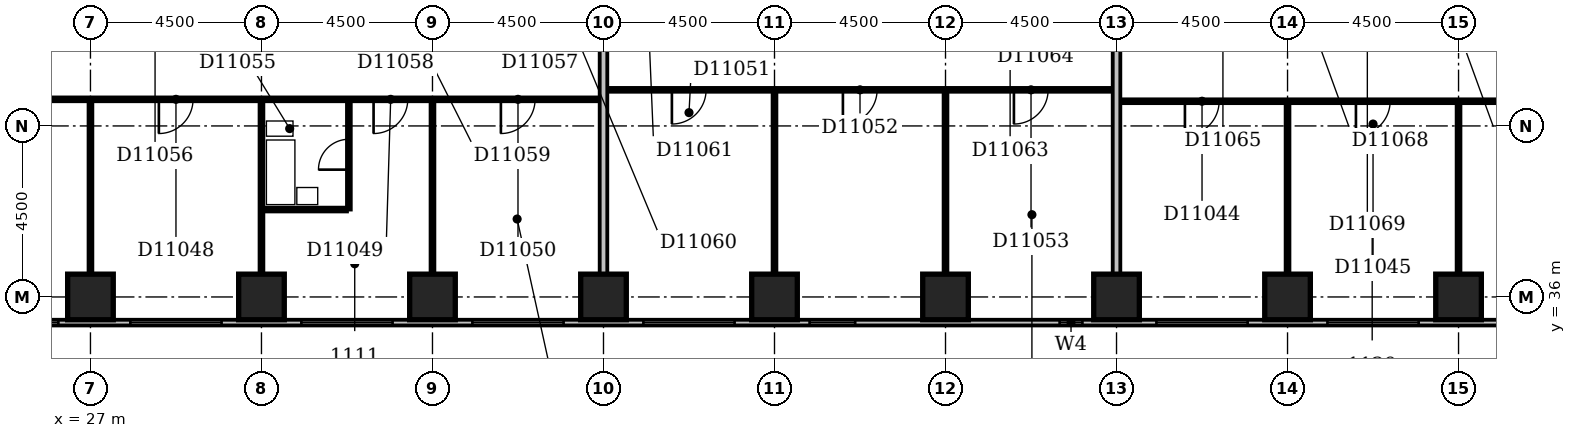
"""IFC4 building model, lengths in metres.
Left out: names, types, materials, properties, quantities, classifications, styles, units other than length and angle.
Written with IfcOpenShell. Run it as: python <this file> out.ifc"""

import sys

from ifc_helpers import new_model, si_unit, direction, frame, frame_2d, origin, origin_2d, place, context, subcontext, project, spatial, rectangle, extrude, element, fill, save


model = new_model("IFC4")
c1 = context("Model", 3, precision=1e-05, world=origin(), true_north=direction((0.0, 1.0)))
c2 = subcontext(c1, "Body", "Model", "MODEL_VIEW")
j1 = project(units=[si_unit("LENGTHUNIT", "METRE"), si_unit("PLANEANGLEUNIT", "RADIAN")], contexts=[c1])
p1 = place(None, origin())
s1 = spatial("IfcSite", under=j1, at=p1, CompositionType="ELEMENT")
p2 = place(p1, origin())
s2 = spatial("IfcBuilding", under=s1, at=p2, CompositionType="ELEMENT")
p3 = place(p2, frame((0.0, 0.0, 50.6)))
s3 = spatial("IfcBuildingStorey", under=s2, at=p3, CompositionType="ELEMENT", Elevation=50.6)
for number, where, z_axis, x_axis in (
    (1, (27.0, 36.0, -0.3), (0.0, 0.0, 1.0), (1.0, 0.0, 0.0)),
    (2, (31.5, 36.0, -0.3), (0.0, 0.0, 1.0), (1.0, 0.0, 0.0)),
    (3, (36.0, 36.0, -0.3), (0.0, 0.0, 1.0), (1.0, 0.0, 0.0)),
    (4, (40.5, 36.0, -0.3), (0.0, 0.0, 1.0), (1.0, 0.0, 0.0)),
    (5, (45.0, 36.0, -0.3), (0.0, 0.0, 1.0), (1.0, 0.0, 0.0)),
    (6, (49.5, 36.0, -0.3), (0.0, 0.0, 1.0), (1.0, 0.0, 0.0)),
    (7, (54.0, 36.0, -0.3), (0.0, 0.0, 1.0), (1.0, 0.0, 0.0)),
    (8, (58.5, 36.0, -0.3), (0.0, 0.0, 1.0), (1.0, 0.0, 0.0)),
    (9, (63.0, 36.0, -0.3), (0.0, 0.0, 1.0), (1.0, 0.0, 0.0)),
):
    element("IfcColumn", number, at=place(p3, frame(where, z_axis=z_axis, x_axis=x_axis)), inside=s3, PredefinedType="COLUMN", context=c2, shape_type="SweptSolid", body=[
        extrude(rectangle(XDim=1.2, YDim=1.2, at=origin_2d()), origin(), (0.0, 0.0, 1.0), 3.6),
    ])
p4 = place(p3, frame((23.1, 35.325, 0.0), z_axis=(0.0, 0.0, 1.0), x_axis=(1.0, 0.0, 0.0)))
e10 = element("IfcWall", 10, at=p4, inside=s3, PredefinedType="STANDARD", context=c2, shape_type="SweptSolid", body=[
    extrude(rectangle(XDim=45.15, YDim=0.15, at=frame_2d((22.575, 0.0))), origin(), (0.0, 0.0, 1.0), 2.7),
])
p5 = place(p4, frame((0.235, 0.0, 0.6)))
e11 = element("IfcOpeningElement", 11, at=p5, cuts=e10, PredefinedType="OPENING", context=c2, shape_type="SweptSolid", body=[
    extrude(rectangle(XDim=0.45, YDim=1.8, at=frame_2d((0.225, 0.9))), frame((0.0, 0.087, 0.0), z_axis=(0.0, -1.0, 0.0), x_axis=(1.0, 0.0, 0.0)), (0.0, 0.0, 1.0), 0.174),
])
p6 = place(p4, frame((2.605, 0.0, 0.6)))
e12 = element("IfcOpeningElement", 12, at=p6, cuts=e10, PredefinedType="OPENING", context=c2, shape_type="SweptSolid", body=[
    extrude(rectangle(XDim=0.45, YDim=1.8, at=frame_2d((0.225, 0.9))), frame((0.0, 0.087, 0.0), z_axis=(0.0, -1.0, 0.0), x_axis=(1.0, 0.0, 0.0)), (0.0, 0.0, 1.0), 0.174),
])
p7 = place(p4, frame((4.95, 0.0, 0.6)))
e13 = element("IfcOpeningElement", 13, at=p7, cuts=e10, PredefinedType="OPENING", context=c2, shape_type="SweptSolid", body=[
    extrude(rectangle(XDim=2.4, YDim=1.8, at=frame_2d((1.2, 0.9))), frame((0.0, 0.087, 0.0), z_axis=(0.0, -1.0, 0.0), x_axis=(1.0, 0.0, 0.0)), (0.0, 0.0, 1.0), 0.174),
])
p8 = place(p4, frame((9.45, 0.0, 0.6)))
e14 = element("IfcOpeningElement", 14, at=p8, cuts=e10, PredefinedType="OPENING", context=c2, shape_type="SweptSolid", body=[
    extrude(rectangle(XDim=2.4, YDim=1.8, at=frame_2d((1.2, 0.9))), frame((0.0, 0.087, 0.0), z_axis=(0.0, -1.0, 0.0), x_axis=(1.0, 0.0, 0.0)), (0.0, 0.0, 1.0), 0.174),
])
p9 = place(p4, frame((13.95, 0.0, 0.6)))
e15 = element("IfcOpeningElement", 15, at=p9, cuts=e10, PredefinedType="OPENING", context=c2, shape_type="SweptSolid", body=[
    extrude(rectangle(XDim=2.4, YDim=1.8, at=frame_2d((1.2, 0.9))), frame((0.0, 0.087, 0.0), z_axis=(0.0, -1.0, 0.0), x_axis=(1.0, 0.0, 0.0)), (0.0, 0.0, 1.0), 0.174),
])
p10 = place(p4, frame((18.45, 0.0, 0.6)))
e16 = element("IfcOpeningElement", 16, at=p10, cuts=e10, PredefinedType="OPENING", context=c2, shape_type="SweptSolid", body=[
    extrude(rectangle(XDim=2.4, YDim=1.8, at=frame_2d((1.2, 0.9))), frame((0.0, 0.087, 0.0), z_axis=(0.0, -1.0, 0.0), x_axis=(1.0, 0.0, 0.0)), (0.0, 0.0, 1.0), 0.174),
])
p11 = place(p4, frame((22.823, 0.0, 0.6)))
e17 = element("IfcOpeningElement", 17, at=p11, cuts=e10, PredefinedType="OPENING", context=c2, shape_type="SweptSolid", body=[
    extrude(rectangle(XDim=1.2, YDim=1.8, at=frame_2d((0.6, 0.9))), frame((0.0, 0.087, 0.0), z_axis=(0.0, -1.0, 0.0), x_axis=(1.0, 0.0, 0.0)), (0.0, 0.0, 1.0), 0.174),
])
p12 = place(p4, frame((29.403, 0.0, 0.6)))
e18 = element("IfcOpeningElement", 18, at=p12, cuts=e10, PredefinedType="OPENING", context=c2, shape_type="SweptSolid", body=[
    extrude(rectangle(XDim=0.6, YDim=1.8, at=frame_2d((0.3, 0.9))), frame((0.0, 0.087, 0.0), z_axis=(0.0, -1.0, 0.0), x_axis=(1.0, 0.0, 0.0)), (0.0, 0.0, 1.0), 0.174),
])
p13 = place(p4, frame((31.95, 0.0, 0.6)))
e19 = element("IfcOpeningElement", 19, at=p13, cuts=e10, PredefinedType="OPENING", context=c2, shape_type="SweptSolid", body=[
    extrude(rectangle(XDim=2.4, YDim=1.8, at=frame_2d((1.2, 0.9))), frame((0.0, 0.087, 0.0), z_axis=(0.0, -1.0, 0.0), x_axis=(1.0, 0.0, 0.0)), (0.0, 0.0, 1.0), 0.174),
])
p14 = place(p4, frame((36.45, 0.0, 0.6)))
e20 = element("IfcOpeningElement", 20, at=p14, cuts=e10, PredefinedType="OPENING", context=c2, shape_type="SweptSolid", body=[
    extrude(rectangle(XDim=2.4, YDim=1.8, at=frame_2d((1.2, 0.9))), frame((0.0, 0.087, 0.0), z_axis=(0.0, -1.0, 0.0), x_axis=(1.0, 0.0, 0.0)), (0.0, 0.0, 1.0), 0.174),
])
p15 = place(p4, frame((40.95, 0.0, 0.6)))
e21 = element("IfcOpeningElement", 21, at=p15, cuts=e10, PredefinedType="OPENING", context=c2, shape_type="SweptSolid", body=[
    extrude(rectangle(XDim=2.4, YDim=1.8, at=frame_2d((1.2, 0.9))), frame((0.0, 0.087, 0.0), z_axis=(0.0, -1.0, 0.0), x_axis=(1.0, 0.0, 0.0)), (0.0, 0.0, 1.0), 0.174),
])
p16 = place(p3, frame((27.0, 36.6, 0.0), z_axis=(0.0, 0.0, 1.0), x_axis=(0.0, 1.0, 0.0)))
e22 = element("IfcWall", 22, at=p16, inside=s3, PredefinedType="PARTITIONING", context=c2, shape_type="SweptSolid", body=[
    extrude(rectangle(XDim=4.55, YDim=0.1, at=frame_2d((2.275, 0.0))), origin(), (0.0, 0.0, 1.0), 2.6),
])
p17 = place(p3, frame((31.5, 36.6, 0.0), z_axis=(0.0, 0.0, 1.0), x_axis=(0.0, 1.0, 0.0)))
e23 = element("IfcWall", 23, at=p17, inside=s3, PredefinedType="PARTITIONING", context=c2, shape_type="SweptSolid", body=[
    extrude(rectangle(XDim=4.55, YDim=0.1, at=frame_2d((2.275, 0.0))), origin(), (0.0, 0.0, 1.0), 3.3),
])
p18 = place(p3, frame((36.0, 36.6, 0.0), z_axis=(0.0, 0.0, 1.0), x_axis=(0.0, 1.0, 0.0)))
e24 = element("IfcWall", 24, at=p18, inside=s3, PredefinedType="PARTITIONING", context=c2, shape_type="SweptSolid", body=[
    extrude(rectangle(XDim=4.55, YDim=0.1, at=frame_2d((2.275, 0.0))), origin(), (0.0, 0.0, 1.0), 2.4),
])
p19 = place(p3, frame((40.5, 36.6, 0.0), z_axis=(0.0, 0.0, 1.0), x_axis=(0.0, 1.0, 0.0)))
e25 = element("IfcWall", 25, at=p19, inside=s3, PredefinedType="PARTITIONING", context=c2, shape_type="SweptSolid", body=[
    extrude(rectangle(XDim=12.8, YDim=0.2, at=frame_2d((6.4, 0.0))), origin(), (0.0, 0.0, 1.0), 3.3),
])
p20 = place(p3, frame((45.0, 36.6, 0.0), z_axis=(0.0, 0.0, 1.0), x_axis=(0.0, 1.0, 0.0)))
e26 = element("IfcWall", 26, at=p20, inside=s3, PredefinedType="PARTITIONING", context=c2, shape_type="SweptSolid", body=[
    extrude(rectangle(XDim=4.8, YDim=0.1, at=frame_2d((2.4, 0.0))), origin(), (0.0, 0.0, 1.0), 2.6),
])
p21 = place(p3, frame((49.5, 36.6, 0.0), z_axis=(0.0, 0.0, 1.0), x_axis=(0.0, 1.0, 0.0)))
e27 = element("IfcWall", 27, at=p21, inside=s3, PredefinedType="PARTITIONING", context=c2, shape_type="SweptSolid", body=[
    extrude(rectangle(XDim=4.8, YDim=0.1, at=frame_2d((2.4, 0.0))), origin(), (0.0, 0.0, 1.0), 3.3),
])
p22 = place(p3, frame((54.0, 36.6, 0.0), z_axis=(0.0, 0.0, 1.0), x_axis=(0.0, 1.0, 0.0)))
e28 = element("IfcWall", 28, at=p22, inside=s3, PredefinedType="PARTITIONING", context=c2, shape_type="SweptSolid", body=[
    extrude(rectangle(XDim=12.8, YDim=0.2, at=frame_2d((6.4, 0.0))), origin(), (0.0, 0.0, 1.0), 2.6),
])
p23 = place(p3, frame((58.5, 36.6, 0.0), z_axis=(0.0, 0.0, 1.0), x_axis=(0.0, 1.0, 0.0)))
e29 = element("IfcWall", 29, at=p23, inside=s3, PredefinedType="PARTITIONING", context=c2, shape_type="SweptSolid", body=[
    extrude(rectangle(XDim=4.5, YDim=0.1, at=frame_2d((2.25, 0.0))), origin(), (0.0, 0.0, 1.0), 3.3),
])
p24 = place(p3, frame((63.0, 36.6, 0.0), z_axis=(0.0, 0.0, 1.0), x_axis=(0.0, 1.0, 0.0)))
e30 = element("IfcWall", 30, at=p24, inside=s3, PredefinedType="PARTITIONING", context=c2, shape_type="SweptSolid", body=[
    extrude(rectangle(XDim=4.5, YDim=0.1, at=frame_2d((2.25, 0.0))), origin(), (0.0, 0.0, 1.0), 2.4),
])
p25 = place(p3, frame((31.55, 38.3, 0.0), z_axis=(0.0, 0.0, 1.0), x_axis=(1.0, 0.0, 0.0)))
e31 = element("IfcWall", 31, at=p25, inside=s3, PredefinedType="PLUMBINGWALL", context=c2, shape_type="SweptSolid", body=[
    extrude(rectangle(XDim=2.2, YDim=0.1, at=frame_2d((1.1, 0.0))), origin(), (0.0, 0.0, 1.0), 3.3),
])
p26 = place(p3, frame((33.8, 38.3, 0.0), z_axis=(0.0, 0.0, 1.0), x_axis=(0.0, 1.0, 0.0)))
e32 = element("IfcWall", 32, at=p26, inside=s3, PredefinedType="PLUMBINGWALL", context=c2, shape_type="SweptSolid", body=[
    extrude(rectangle(XDim=2.85, YDim=0.1, at=frame_2d((1.425, 0.0))), origin(), (0.0, 0.0, 1.0), 3.3),
])
p27 = place(p26, frame((1.05, 0.0, 0.0)))
e33 = element("IfcOpeningElement", 33, at=p27, cuts=e32, PredefinedType="OPENING", context=c2, shape_type="SweptSolid", body=[
    extrude(rectangle(XDim=0.8, YDim=2.1, at=frame_2d((0.4, 1.05))), frame((0.0, 0.062, 0.0), z_axis=(0.0, -1.0, 0.0), x_axis=(1.0, 0.0, 0.0)), (0.0, 0.0, 1.0), 0.124),
])
p28 = place(p3, frame((54.1, 41.15, 0.0), z_axis=(0.0, 0.0, 1.0), x_axis=(1.0, 0.0, 0.0)))
e34 = element("IfcWall", 34, at=p28, inside=s3, PredefinedType="PARTITIONING", context=c2, shape_type="SweptSolid", body=[
    extrude(rectangle(XDim=14.0, YDim=0.1, at=frame_2d((7.0, 0.0))), origin(), (0.0, 0.0, 1.0), 3.3),
])
p29 = place(p28, frame((1.7, 0.0, 0.0)))
e35 = element("IfcOpeningElement", 35, at=p29, cuts=e34, PredefinedType="OPENING", context=c2, shape_type="SweptSolid", body=[
    extrude(rectangle(XDim=0.9, YDim=2.1, at=frame_2d((0.45, 1.05))), frame((0.0, 0.062, 0.0), z_axis=(0.0, -1.0, 0.0), x_axis=(1.0, 0.0, 0.0)), (0.0, 0.0, 1.0), 0.124),
])
p30 = place(p28, frame((6.2, 0.0, 0.0)))
e36 = element("IfcOpeningElement", 36, at=p30, cuts=e34, PredefinedType="OPENING", context=c2, shape_type="SweptSolid", body=[
    extrude(rectangle(XDim=0.9, YDim=2.1, at=frame_2d((0.45, 1.05))), frame((0.0, 0.062, 0.0), z_axis=(0.0, -1.0, 0.0), x_axis=(1.0, 0.0, 0.0)), (0.0, 0.0, 1.0), 0.124),
])
p31 = place(p28, frame((10.7, 0.0, 0.0)))
e37 = element("IfcOpeningElement", 37, at=p31, cuts=e34, PredefinedType="OPENING", context=c2, shape_type="SweptSolid", body=[
    extrude(rectangle(XDim=0.9, YDim=2.1, at=frame_2d((0.45, 1.05))), frame((0.0, 0.062, 0.0), z_axis=(0.0, -1.0, 0.0), x_axis=(1.0, 0.0, 0.0)), (0.0, 0.0, 1.0), 0.124),
])
p32 = place(p3, frame((22.6, 41.2, 0.0), z_axis=(0.0, 0.0, 1.0), x_axis=(1.0, 0.0, 0.0)))
e38 = element("IfcWall", 38, at=p32, inside=s3, PredefinedType="PARTITIONING", context=c2, shape_type="SweptSolid", body=[
    extrude(rectangle(XDim=17.8, YDim=0.1, at=frame_2d((8.9, 0.0))), origin(), (0.0, 0.0, 1.0), 3.3),
])
p33 = place(p32, frame((1.7, 0.0, 0.0)))
e39 = element("IfcOpeningElement", 39, at=p33, cuts=e38, PredefinedType="OPENING", context=c2, shape_type="SweptSolid", body=[
    extrude(rectangle(XDim=0.9, YDim=2.1, at=frame_2d((0.45, 1.05))), frame((0.0, 0.062, 0.0), z_axis=(0.0, -1.0, 0.0), x_axis=(1.0, 0.0, 0.0)), (0.0, 0.0, 1.0), 0.124),
])
p34 = place(p32, frame((6.2, 0.0, 0.0)))
e40 = element("IfcOpeningElement", 40, at=p34, cuts=e38, PredefinedType="OPENING", context=c2, shape_type="SweptSolid", body=[
    extrude(rectangle(XDim=0.9, YDim=2.1, at=frame_2d((0.45, 1.05))), frame((0.0, 0.062, 0.0), z_axis=(0.0, -1.0, 0.0), x_axis=(1.0, 0.0, 0.0)), (0.0, 0.0, 1.0), 0.124),
])
p35 = place(p32, frame((11.85, 0.0, 0.0)))
e41 = element("IfcOpeningElement", 41, at=p35, cuts=e38, PredefinedType="OPENING", context=c2, shape_type="SweptSolid", body=[
    extrude(rectangle(XDim=0.9, YDim=2.1, at=frame_2d((0.45, 1.05))), frame((0.0, 0.062, 0.0), z_axis=(0.0, -1.0, 0.0), x_axis=(1.0, 0.0, 0.0)), (0.0, 0.0, 1.0), 0.124),
])
p36 = place(p32, frame((15.2, 0.0, 0.0)))
e42 = element("IfcOpeningElement", 42, at=p36, cuts=e38, PredefinedType="OPENING", context=c2, shape_type="SweptSolid", body=[
    extrude(rectangle(XDim=0.9, YDim=2.1, at=frame_2d((0.45, 1.05))), frame((0.0, 0.062, 0.0), z_axis=(0.0, -1.0, 0.0), x_axis=(1.0, 0.0, 0.0)), (0.0, 0.0, 1.0), 0.124),
])
p37 = place(p3, frame((40.6, 41.45, 0.0), z_axis=(0.0, 0.0, 1.0), x_axis=(1.0, 0.0, 0.0)))
e43 = element("IfcWall", 43, at=p37, inside=s3, PredefinedType="PARTITIONING", context=c2, shape_type="SweptSolid", body=[
    extrude(rectangle(XDim=13.3, YDim=0.1, at=frame_2d((6.65, 0.0))), origin(), (0.0, 0.0, 1.0), 3.3),
])
p38 = place(p37, frame((1.7, 0.0, 0.0)))
e44 = element("IfcOpeningElement", 44, at=p38, cuts=e43, PredefinedType="OPENING", context=c2, shape_type="SweptSolid", body=[
    extrude(rectangle(XDim=0.9, YDim=2.1, at=frame_2d((0.45, 1.05))), frame((0.0, 0.062, 0.0), z_axis=(0.0, -1.0, 0.0), x_axis=(1.0, 0.0, 0.0)), (0.0, 0.0, 1.0), 0.124),
])
p39 = place(p37, frame((6.2, 0.0, 0.0)))
e45 = element("IfcOpeningElement", 45, at=p39, cuts=e43, PredefinedType="OPENING", context=c2, shape_type="SweptSolid", body=[
    extrude(rectangle(XDim=0.9, YDim=2.1, at=frame_2d((0.45, 1.05))), frame((0.0, 0.062, 0.0), z_axis=(0.0, -1.0, 0.0), x_axis=(1.0, 0.0, 0.0)), (0.0, 0.0, 1.0), 0.124),
])
p40 = place(p37, frame((10.7, 0.0, 0.0)))
e46 = element("IfcOpeningElement", 46, at=p40, cuts=e43, PredefinedType="OPENING", context=c2, shape_type="SweptSolid", body=[
    extrude(rectangle(XDim=0.9, YDim=2.1, at=frame_2d((0.45, 1.05))), frame((0.0, 0.062, 0.0), z_axis=(0.0, -1.0, 0.0), x_axis=(1.0, 0.0, 0.0)), (0.0, 0.0, 1.0), 0.124),
])
p41 = place(p6, origin())
e47 = element("IfcWindow", 47, at=p41, inside=s3, PartitioningType="SINGLE_PANEL", PredefinedType="WINDOW", context=c2, shape_type="SweptSolid", body=[
    extrude(rectangle(XDim=0.45, YDim=1.8, at=frame_2d((0.225, 0.9))), frame((0.0, 0.03, 0.0), z_axis=(0.0, -1.0, 0.0), x_axis=(1.0, 0.0, 0.0)), (0.0, 0.0, 1.0), 0.06),
])
fill(e12, e47)
p42 = place(p7, origin())
e48 = element("IfcWindow", 48, at=p42, inside=s3, PartitioningType="SINGLE_PANEL", PredefinedType="WINDOW", context=c2, shape_type="SweptSolid", body=[
    extrude(rectangle(XDim=2.4, YDim=1.8, at=frame_2d((1.2, 0.9))), frame((0.0, 0.03, 0.0), z_axis=(0.0, -1.0, 0.0), x_axis=(1.0, 0.0, 0.0)), (0.0, 0.0, 1.0), 0.06),
])
fill(e13, e48)
p43 = place(p8, origin())
e49 = element("IfcWindow", 49, at=p43, inside=s3, PartitioningType="SINGLE_PANEL", PredefinedType="WINDOW", context=c2, shape_type="SweptSolid", body=[
    extrude(rectangle(XDim=2.4, YDim=1.8, at=frame_2d((1.2, 0.9))), frame((0.0, 0.03, 0.0), z_axis=(0.0, -1.0, 0.0), x_axis=(1.0, 0.0, 0.0)), (0.0, 0.0, 1.0), 0.06),
])
fill(e14, e49)
p44 = place(p9, origin())
e50 = element("IfcWindow", 50, at=p44, inside=s3, PartitioningType="SINGLE_PANEL", PredefinedType="WINDOW", context=c2, shape_type="SweptSolid", body=[
    extrude(rectangle(XDim=2.4, YDim=1.8, at=frame_2d((1.2, 0.9))), frame((0.0, 0.03, 0.0), z_axis=(0.0, -1.0, 0.0), x_axis=(1.0, 0.0, 0.0)), (0.0, 0.0, 1.0), 0.06),
])
fill(e15, e50)
p45 = place(p10, origin())
e51 = element("IfcWindow", 51, at=p45, inside=s3, PartitioningType="SINGLE_PANEL", PredefinedType="WINDOW", context=c2, shape_type="SweptSolid", body=[
    extrude(rectangle(XDim=2.4, YDim=1.8, at=frame_2d((1.2, 0.9))), frame((0.0, 0.03, 0.0), z_axis=(0.0, -1.0, 0.0), x_axis=(1.0, 0.0, 0.0)), (0.0, 0.0, 1.0), 0.06),
])
fill(e16, e51)
p46 = place(p11, origin())
e52 = element("IfcWindow", 52, at=p46, inside=s3, PartitioningType="SINGLE_PANEL", PredefinedType="WINDOW", context=c2, shape_type="SweptSolid", body=[
    extrude(rectangle(XDim=1.2, YDim=1.8, at=frame_2d((0.6, 0.9))), frame((0.0, 0.03, 0.0), z_axis=(0.0, -1.0, 0.0), x_axis=(1.0, 0.0, 0.0)), (0.0, 0.0, 1.0), 0.06),
])
fill(e17, e52)
p47 = place(p12, origin())
e53 = element("IfcWindow", 53, at=p47, inside=s3, PartitioningType="SINGLE_PANEL", PredefinedType="WINDOW", context=c2, shape_type="SweptSolid", body=[
    extrude(rectangle(XDim=0.6, YDim=1.8, at=frame_2d((0.3, 0.9))), frame((0.0, 0.03, 0.0), z_axis=(0.0, -1.0, 0.0), x_axis=(1.0, 0.0, 0.0)), (0.0, 0.0, 1.0), 0.06),
])
fill(e18, e53)
p48 = place(p13, origin())
e54 = element("IfcWindow", 54, at=p48, inside=s3, PartitioningType="SINGLE_PANEL", PredefinedType="WINDOW", context=c2, shape_type="SweptSolid", body=[
    extrude(rectangle(XDim=2.4, YDim=1.8, at=frame_2d((1.2, 0.9))), frame((0.0, 0.03, 0.0), z_axis=(0.0, -1.0, 0.0), x_axis=(1.0, 0.0, 0.0)), (0.0, 0.0, 1.0), 0.06),
])
fill(e19, e54)
p49 = place(p14, origin())
e55 = element("IfcWindow", 55, at=p49, inside=s3, PartitioningType="SINGLE_PANEL", PredefinedType="WINDOW", context=c2, shape_type="SweptSolid", body=[
    extrude(rectangle(XDim=2.4, YDim=1.8, at=frame_2d((1.2, 0.9))), frame((0.0, 0.03, 0.0), z_axis=(0.0, -1.0, 0.0), x_axis=(1.0, 0.0, 0.0)), (0.0, 0.0, 1.0), 0.06),
])
fill(e20, e55)
p50 = place(p27, origin())
e56 = element("IfcDoor", 56, at=p50, inside=s3, OperationType="SINGLE_SWING_LEFT", PredefinedType="DOOR", context=c2, shape_type="SweptSolid", body=[
    extrude(rectangle(XDim=0.8, YDim=2.1, at=frame_2d((0.4, 1.05))), frame((0.0, 0.025, 0.0), z_axis=(0.0, -1.0, 0.0), x_axis=(1.0, 0.0, 0.0)), (0.0, 0.0, 1.0), 0.05),
])
fill(e33, e56)
p51 = place(p29, frame((0.9, 0.0, 0.0), z_axis=(0.0, 0.0, 1.0), x_axis=(-1.0, 0.0, 0.0)))
e57 = element("IfcDoor", 57, at=p51, inside=s3, OperationType="SINGLE_SWING_RIGHT", PredefinedType="DOOR", context=c2, shape_type="SweptSolid", body=[
    extrude(rectangle(XDim=0.9, YDim=2.1, at=frame_2d((0.45, 1.05))), frame((0.0, 0.025, 0.0), z_axis=(0.0, -1.0, 0.0), x_axis=(1.0, 0.0, 0.0)), (0.0, 0.0, 1.0), 0.05),
])
fill(e35, e57)
p52 = place(p30, frame((0.9, 0.0, 0.0), z_axis=(0.0, 0.0, 1.0), x_axis=(-1.0, 0.0, 0.0)))
e58 = element("IfcDoor", 58, at=p52, inside=s3, OperationType="SINGLE_SWING_RIGHT", PredefinedType="DOOR", context=c2, shape_type="SweptSolid", body=[
    extrude(rectangle(XDim=0.9, YDim=2.1, at=frame_2d((0.45, 1.05))), frame((0.0, 0.025, 0.0), z_axis=(0.0, -1.0, 0.0), x_axis=(1.0, 0.0, 0.0)), (0.0, 0.0, 1.0), 0.05),
])
fill(e36, e58)
p53 = place(p34, frame((0.9, 0.0, 0.0), z_axis=(0.0, 0.0, 1.0), x_axis=(-1.0, 0.0, 0.0)))
e59 = element("IfcDoor", 59, at=p53, inside=s3, OperationType="SINGLE_SWING_RIGHT", PredefinedType="DOOR", context=c2, shape_type="SweptSolid", body=[
    extrude(rectangle(XDim=0.9, YDim=2.1, at=frame_2d((0.45, 1.05))), frame((0.0, 0.025, 0.0), z_axis=(0.0, -1.0, 0.0), x_axis=(1.0, 0.0, 0.0)), (0.0, 0.0, 1.0), 0.05),
])
fill(e40, e59)
p54 = place(p35, frame((0.9, 0.0, 0.0), z_axis=(0.0, 0.0, 1.0), x_axis=(-1.0, 0.0, 0.0)))
e60 = element("IfcDoor", 60, at=p54, inside=s3, OperationType="SINGLE_SWING_RIGHT", PredefinedType="DOOR", context=c2, shape_type="SweptSolid", body=[
    extrude(rectangle(XDim=0.9, YDim=2.1, at=frame_2d((0.45, 1.05))), frame((0.0, 0.025, 0.0), z_axis=(0.0, -1.0, 0.0), x_axis=(1.0, 0.0, 0.0)), (0.0, 0.0, 1.0), 0.05),
])
fill(e41, e60)
p55 = place(p36, frame((0.9, 0.0, 0.0), z_axis=(0.0, 0.0, 1.0), x_axis=(-1.0, 0.0, 0.0)))
e61 = element("IfcDoor", 61, at=p55, inside=s3, OperationType="SINGLE_SWING_RIGHT", PredefinedType="DOOR", context=c2, shape_type="SweptSolid", body=[
    extrude(rectangle(XDim=0.9, YDim=2.1, at=frame_2d((0.45, 1.05))), frame((0.0, 0.025, 0.0), z_axis=(0.0, -1.0, 0.0), x_axis=(1.0, 0.0, 0.0)), (0.0, 0.0, 1.0), 0.05),
])
fill(e42, e61)
p56 = place(p38, frame((0.9, 0.0, 0.0), z_axis=(0.0, 0.0, 1.0), x_axis=(-1.0, 0.0, 0.0)))
e62 = element("IfcDoor", 62, at=p56, inside=s3, OperationType="SINGLE_SWING_RIGHT", PredefinedType="DOOR", context=c2, shape_type="SweptSolid", body=[
    extrude(rectangle(XDim=0.9, YDim=2.1, at=frame_2d((0.45, 1.05))), frame((0.0, 0.025, 0.0), z_axis=(0.0, -1.0, 0.0), x_axis=(1.0, 0.0, 0.0)), (0.0, 0.0, 1.0), 0.05),
])
fill(e44, e62)
p57 = place(p39, frame((0.9, 0.0, 0.0), z_axis=(0.0, 0.0, 1.0), x_axis=(-1.0, 0.0, 0.0)))
e63 = element("IfcDoor", 63, at=p57, inside=s3, OperationType="SINGLE_SWING_RIGHT", PredefinedType="DOOR", context=c2, shape_type="SweptSolid", body=[
    extrude(rectangle(XDim=0.9, YDim=2.1, at=frame_2d((0.45, 1.05))), frame((0.0, 0.025, 0.0), z_axis=(0.0, -1.0, 0.0), x_axis=(1.0, 0.0, 0.0)), (0.0, 0.0, 1.0), 0.05),
])
fill(e45, e63)
p58 = place(p40, frame((0.9, 0.0, 0.0), z_axis=(0.0, 0.0, 1.0), x_axis=(-1.0, 0.0, 0.0)))
e64 = element("IfcDoor", 64, at=p58, inside=s3, OperationType="SINGLE_SWING_RIGHT", PredefinedType="DOOR", context=c2, shape_type="SweptSolid", body=[
    extrude(rectangle(XDim=0.9, YDim=2.1, at=frame_2d((0.45, 1.05))), frame((0.0, 0.025, 0.0), z_axis=(0.0, -1.0, 0.0), x_axis=(1.0, 0.0, 0.0)), (0.0, 0.0, 1.0), 0.05),
])
fill(e46, e64)
save(model, sys.argv[1])
